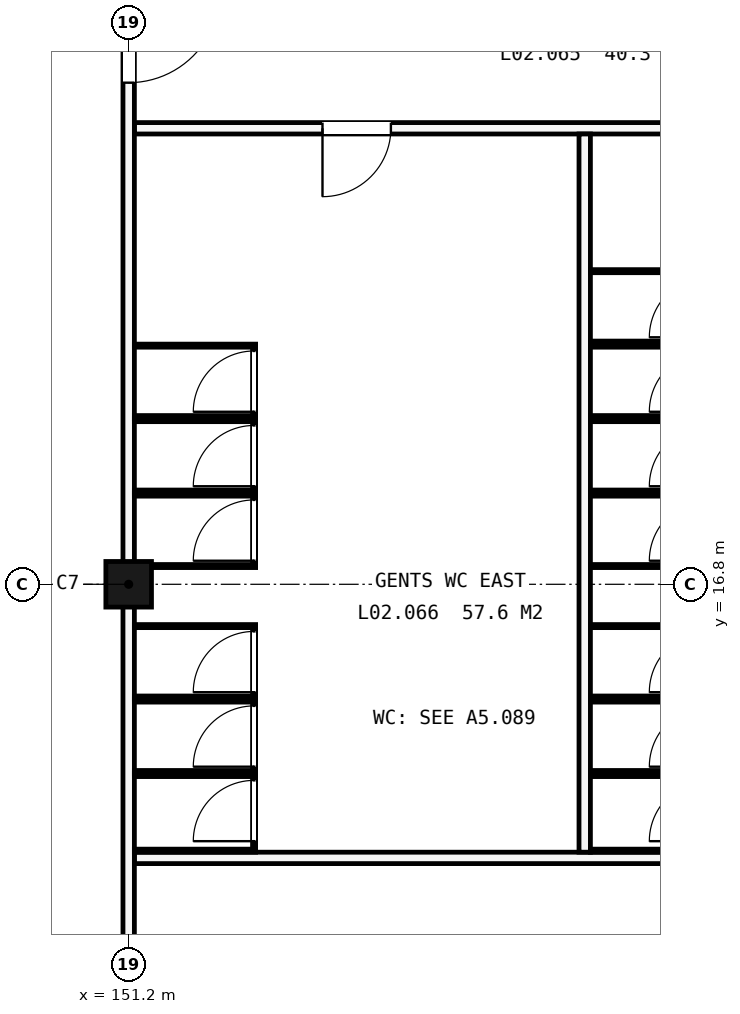
"""IFC4 building model, lengths in metres.
Left out: names, types, materials, properties, quantities, classifications, styles, units other than length and angle.
Written with IfcOpenShell. Run it as: python <this file> out.ifc"""

import sys

from ifc_helpers import new_model, si_unit, direction, frame, frame_2d, origin, origin_2d, place, context, subcontext, project, spatial, rectangle, extrude, element, fill, save


model = new_model("IFC4")
c1 = context("Model", 3, precision=1e-05, world=origin(), true_north=direction((0.0, 1.0)))
c2 = subcontext(c1, "Body", "Model", "MODEL_VIEW")
j1 = project(units=[si_unit("LENGTHUNIT", "METRE"), si_unit("PLANEANGLEUNIT", "RADIAN")], contexts=[c1])
p1 = place(None, origin())
s1 = spatial("IfcSite", under=j1, at=p1, CompositionType="ELEMENT")
p2 = place(p1, origin())
s2 = spatial("IfcBuilding", under=s1, at=p2, CompositionType="ELEMENT")
p3 = place(p2, frame((0.0, 0.0, 9.9)))
s3 = spatial("IfcBuildingStorey", under=s2, at=p3, CompositionType="ELEMENT", Elevation=9.9)
p4 = place(p3, frame((151.2, 16.8, -0.25), z_axis=(0.0, 0.0, 1.0), x_axis=(1.0, 0.0, 0.0)))
e1 = element("IfcColumn", 1, at=p4, inside=s3, PredefinedType="COLUMN", context=c2, shape_type="SweptSolid", body=[
    extrude(rectangle(XDim=0.6, YDim=0.6, at=origin_2d()), origin(), (0.0, 0.0, 1.0), 4.45),
])
p5 = place(p3, frame((151.275, 13.2, 0.0), z_axis=(0.0, 0.0, 1.0), x_axis=(1.0, 0.0, 0.0)))
e2 = element("IfcWall", 2, at=p5, inside=s3, PredefinedType="PARTITIONING", context=c2, shape_type="SweptSolid", body=[
    extrude(rectangle(XDim=16.725, YDim=0.15, at=frame_2d((8.363, 0.0))), origin(), (0.0, 0.0, 1.0), 4.2),
])
p6 = place(p5, frame((13.825, 0.0, 0.0)))
e3 = element("IfcOpeningElement", 3, at=p6, cuts=e2, PredefinedType="OPENING", context=c2, shape_type="SweptSolid", body=[
    extrude(rectangle(XDim=1.0, YDim=2.1, at=frame_2d((0.5, 1.05))), frame((0.0, 0.085, 0.0), z_axis=(0.0, -1.0, 0.0), x_axis=(1.0, 0.0, 0.0)), (0.0, 0.0, 1.0), 0.17),
])
p7 = place(p3, frame((151.275, 22.8, 0.0), z_axis=(0.0, 0.0, 1.0), x_axis=(1.0, 0.0, 0.0)))
e4 = element("IfcWall", 4, at=p7, inside=s3, PredefinedType="PARTITIONING", context=c2, shape_type="SweptSolid", body=[
    extrude(rectangle(XDim=16.575, YDim=0.15, at=frame_2d((8.288, 0.0))), origin(), (0.0, 0.0, 1.0), 4.2),
])
p8 = place(p7, frame((2.475, 0.0, 0.0)))
e5 = element("IfcOpeningElement", 5, at=p8, cuts=e4, PredefinedType="OPENING", context=c2, shape_type="SweptSolid", body=[
    extrude(rectangle(XDim=0.9, YDim=2.1, at=frame_2d((0.45, 1.05))), frame((0.0, 0.085, 0.0), z_axis=(0.0, -1.0, 0.0), x_axis=(1.0, 0.0, 0.0)), (0.0, 0.0, 1.0), 0.17),
])
p9 = place(p7, frame((8.475, 0.0, 0.0)))
e6 = element("IfcOpeningElement", 6, at=p9, cuts=e4, PredefinedType="OPENING", context=c2, shape_type="SweptSolid", body=[
    extrude(rectangle(XDim=0.9, YDim=2.1, at=frame_2d((0.45, 1.05))), frame((0.0, 0.085, 0.0), z_axis=(0.0, -1.0, 0.0), x_axis=(1.0, 0.0, 0.0)), (0.0, 0.0, 1.0), 0.17),
])
p10 = place(p7, frame((13.8, 0.0, 0.0)))
e7 = element("IfcOpeningElement", 7, at=p10, cuts=e4, PredefinedType="OPENING", context=c2, shape_type="SweptSolid", body=[
    extrude(rectangle(XDim=1.05, YDim=2.25, at=frame_2d((0.525, 1.125))), frame((0.0, 0.085, 0.0), z_axis=(0.0, -1.0, 0.0), x_axis=(1.0, 0.0, 0.0)), (0.0, 0.0, 1.0), 0.17),
])
p11 = place(p3, frame((151.2, 8.475, 0.0), z_axis=(0.0, 0.0, 1.0), x_axis=(0.0, 1.0, 0.0)))
e8 = element("IfcWall", 8, at=p11, inside=s3, PredefinedType="PARTITIONING", context=c2, shape_type="SweptSolid", body=[
    extrude(rectangle(XDim=16.65, YDim=0.15, at=frame_2d((8.325, 0.0))), origin(), (0.0, 0.0, 1.0), 3.4),
])
p12 = place(p11, frame((14.925, 0.0, 0.0)))
e9 = element("IfcOpeningElement", 9, at=p12, cuts=e8, PredefinedType="OPENING", context=c2, shape_type="SweptSolid", body=[
    extrude(rectangle(XDim=1.2, YDim=2.1, at=frame_2d((0.6, 1.05))), frame((0.0, 0.085, 0.0), z_axis=(0.0, -1.0, 0.0), x_axis=(1.0, 0.0, 0.0)), (0.0, 0.0, 1.0), 0.17),
])
p13 = place(p3, frame((157.2, 13.275, 0.0), z_axis=(0.0, 0.0, 1.0), x_axis=(0.0, 1.0, 0.0)))
e10 = element("IfcWall", 10, at=p13, inside=s3, PredefinedType="PARTITIONING", context=c2, shape_type="SweptSolid", body=[
    extrude(rectangle(XDim=9.45, YDim=0.15, at=frame_2d((4.725, 0.0))), origin(), (0.0, 0.0, 1.0), 4.2),
])
for number, where, z_axis, x_axis in (
    (11, (151.275, 13.295, 0.0), (0.0, 0.0, 1.0), (1.0, 0.0, 0.0)),
    (12, (151.275, 14.29, 0.0), (0.0, 0.0, 1.0), (1.0, 0.0, 0.0)),
):
    element("IfcWall", number, at=place(p3, frame(where, z_axis=z_axis, x_axis=x_axis)), inside=s3, PredefinedType="PARTITIONING", context=c2, shape_type="SweptSolid", body=[
        extrude(rectangle(XDim=1.595, YDim=0.04, at=frame_2d((0.798, 0.0))), origin(), (0.0, 0.0, 1.0), 2.0),
    ])
p14 = place(p3, frame((152.85, 13.315, 0.0), z_axis=(0.0, 0.0, 1.0), x_axis=(0.0, 1.0, 0.0)))
e13 = element("IfcWall", 13, at=p14, inside=s3, PredefinedType="PARTITIONING", context=c2, shape_type="SweptSolid", body=[
    extrude(rectangle(XDim=0.955, YDim=0.04, at=frame_2d((0.478, 0.0))), origin(), (0.0, 0.0, 1.0), 2.0),
])
p15 = place(p14, frame((0.105, 0.0, 0.0)))
e14 = element("IfcOpeningElement", 14, at=p15, cuts=e13, PredefinedType="OPENING", context=c2, shape_type="SweptSolid", body=[
    extrude(rectangle(XDim=0.8, YDim=2.0, at=frame_2d((0.4, 1.0))), frame((0.0, 0.03, 0.0), z_axis=(0.0, -1.0, 0.0), x_axis=(1.0, 0.0, 0.0)), (0.0, 0.0, 1.0), 0.06),
])
for number, where, z_axis, x_axis in (
    (15, (151.275, 14.33, 0.0), (0.0, 0.0, 1.0), (1.0, 0.0, 0.0)),
    (16, (151.275, 15.27, 0.0), (0.0, 0.0, 1.0), (1.0, 0.0, 0.0)),
):
    element("IfcWall", number, at=place(p3, frame(where, z_axis=z_axis, x_axis=x_axis)), inside=s3, PredefinedType="PARTITIONING", context=c2, shape_type="SweptSolid", body=[
        extrude(rectangle(XDim=1.595, YDim=0.04, at=frame_2d((0.798, 0.0))), origin(), (0.0, 0.0, 1.0), 2.0),
    ])
p16 = place(p3, frame((152.85, 14.35, 0.0), z_axis=(0.0, 0.0, 1.0), x_axis=(0.0, 1.0, 0.0)))
e17 = element("IfcWall", 17, at=p16, inside=s3, PredefinedType="PARTITIONING", context=c2, shape_type="SweptSolid", body=[
    extrude(rectangle(XDim=0.9, YDim=0.04, at=frame_2d((0.45, 0.0))), origin(), (0.0, 0.0, 1.0), 2.0),
])
p17 = place(p16, frame((0.05, 0.0, 0.0)))
e18 = element("IfcOpeningElement", 18, at=p17, cuts=e17, PredefinedType="OPENING", context=c2, shape_type="SweptSolid", body=[
    extrude(rectangle(XDim=0.8, YDim=2.0, at=frame_2d((0.4, 1.0))), frame((0.0, 0.03, 0.0), z_axis=(0.0, -1.0, 0.0), x_axis=(1.0, 0.0, 0.0)), (0.0, 0.0, 1.0), 0.06),
])
for number, where, z_axis, x_axis in (
    (19, (151.275, 15.31, 0.0), (0.0, 0.0, 1.0), (1.0, 0.0, 0.0)),
    (20, (151.275, 16.25, 0.0), (0.0, 0.0, 1.0), (1.0, 0.0, 0.0)),
):
    element("IfcWall", number, at=place(p3, frame(where, z_axis=z_axis, x_axis=x_axis)), inside=s3, PredefinedType="PARTITIONING", context=c2, shape_type="SweptSolid", body=[
        extrude(rectangle(XDim=1.595, YDim=0.04, at=frame_2d((0.798, 0.0))), origin(), (0.0, 0.0, 1.0), 2.0),
    ])
p18 = place(p3, frame((152.85, 15.33, 0.0), z_axis=(0.0, 0.0, 1.0), x_axis=(0.0, 1.0, 0.0)))
e21 = element("IfcWall", 21, at=p18, inside=s3, PredefinedType="PARTITIONING", context=c2, shape_type="SweptSolid", body=[
    extrude(rectangle(XDim=0.9, YDim=0.04, at=frame_2d((0.45, 0.0))), origin(), (0.0, 0.0, 1.0), 2.0),
])
p19 = place(p18, frame((0.05, 0.0, 0.0)))
e22 = element("IfcOpeningElement", 22, at=p19, cuts=e21, PredefinedType="OPENING", context=c2, shape_type="SweptSolid", body=[
    extrude(rectangle(XDim=0.8, YDim=2.0, at=frame_2d((0.4, 1.0))), frame((0.0, 0.03, 0.0), z_axis=(0.0, -1.0, 0.0), x_axis=(1.0, 0.0, 0.0)), (0.0, 0.0, 1.0), 0.06),
])
for number, where, z_axis, x_axis in (
    (23, (151.275, 17.04, 0.0), (0.0, 0.0, 1.0), (1.0, 0.0, 0.0)),
    (24, (151.275, 17.98, 0.0), (0.0, 0.0, 1.0), (1.0, 0.0, 0.0)),
):
    element("IfcWall", number, at=place(p3, frame(where, z_axis=z_axis, x_axis=x_axis)), inside=s3, PredefinedType="PARTITIONING", context=c2, shape_type="SweptSolid", body=[
        extrude(rectangle(XDim=1.595, YDim=0.04, at=frame_2d((0.798, 0.0))), origin(), (0.0, 0.0, 1.0), 2.0),
    ])
p20 = place(p3, frame((152.85, 17.06, 0.0), z_axis=(0.0, 0.0, 1.0), x_axis=(0.0, 1.0, 0.0)))
e25 = element("IfcWall", 25, at=p20, inside=s3, PredefinedType="PARTITIONING", context=c2, shape_type="SweptSolid", body=[
    extrude(rectangle(XDim=0.9, YDim=0.04, at=frame_2d((0.45, 0.0))), origin(), (0.0, 0.0, 1.0), 2.0),
])
p21 = place(p20, frame((0.05, 0.0, 0.0)))
e26 = element("IfcOpeningElement", 26, at=p21, cuts=e25, PredefinedType="OPENING", context=c2, shape_type="SweptSolid", body=[
    extrude(rectangle(XDim=0.8, YDim=2.0, at=frame_2d((0.4, 1.0))), frame((0.0, 0.03, 0.0), z_axis=(0.0, -1.0, 0.0), x_axis=(1.0, 0.0, 0.0)), (0.0, 0.0, 1.0), 0.06),
])
for number, where, z_axis, x_axis in (
    (27, (151.275, 18.02, 0.0), (0.0, 0.0, 1.0), (1.0, 0.0, 0.0)),
    (28, (151.275, 18.96, 0.0), (0.0, 0.0, 1.0), (1.0, 0.0, 0.0)),
):
    element("IfcWall", number, at=place(p3, frame(where, z_axis=z_axis, x_axis=x_axis)), inside=s3, PredefinedType="PARTITIONING", context=c2, shape_type="SweptSolid", body=[
        extrude(rectangle(XDim=1.595, YDim=0.04, at=frame_2d((0.798, 0.0))), origin(), (0.0, 0.0, 1.0), 2.0),
    ])
p22 = place(p3, frame((152.85, 18.04, 0.0), z_axis=(0.0, 0.0, 1.0), x_axis=(0.0, 1.0, 0.0)))
e29 = element("IfcWall", 29, at=p22, inside=s3, PredefinedType="PARTITIONING", context=c2, shape_type="SweptSolid", body=[
    extrude(rectangle(XDim=0.9, YDim=0.04, at=frame_2d((0.45, 0.0))), origin(), (0.0, 0.0, 1.0), 2.0),
])
p23 = place(p22, frame((0.05, 0.0, 0.0)))
e30 = element("IfcOpeningElement", 30, at=p23, cuts=e29, PredefinedType="OPENING", context=c2, shape_type="SweptSolid", body=[
    extrude(rectangle(XDim=0.8, YDim=2.0, at=frame_2d((0.4, 1.0))), frame((0.0, 0.03, 0.0), z_axis=(0.0, -1.0, 0.0), x_axis=(1.0, 0.0, 0.0)), (0.0, 0.0, 1.0), 0.06),
])
for number, where, z_axis, x_axis in (
    (31, (151.275, 19.0, 0.0), (0.0, 0.0, 1.0), (1.0, 0.0, 0.0)),
    (32, (151.275, 19.94, 0.0), (0.0, 0.0, 1.0), (1.0, 0.0, 0.0)),
):
    element("IfcWall", number, at=place(p3, frame(where, z_axis=z_axis, x_axis=x_axis)), inside=s3, PredefinedType="PARTITIONING", context=c2, shape_type="SweptSolid", body=[
        extrude(rectangle(XDim=1.595, YDim=0.04, at=frame_2d((0.798, 0.0))), origin(), (0.0, 0.0, 1.0), 2.0),
    ])
p24 = place(p3, frame((152.85, 19.02, 0.0), z_axis=(0.0, 0.0, 1.0), x_axis=(0.0, 1.0, 0.0)))
e33 = element("IfcWall", 33, at=p24, inside=s3, PredefinedType="PARTITIONING", context=c2, shape_type="SweptSolid", body=[
    extrude(rectangle(XDim=0.9, YDim=0.04, at=frame_2d((0.45, 0.0))), origin(), (0.0, 0.0, 1.0), 2.0),
])
p25 = place(p24, frame((0.05, 0.0, 0.0)))
e34 = element("IfcOpeningElement", 34, at=p25, cuts=e33, PredefinedType="OPENING", context=c2, shape_type="SweptSolid", body=[
    extrude(rectangle(XDim=0.8, YDim=2.0, at=frame_2d((0.4, 1.0))), frame((0.0, 0.03, 0.0), z_axis=(0.0, -1.0, 0.0), x_axis=(1.0, 0.0, 0.0)), (0.0, 0.0, 1.0), 0.06),
])
for number, where, z_axis, x_axis in (
    (35, (157.275, 13.295, 0.0), (0.0, 0.0, 1.0), (1.0, 0.0, 0.0)),
    (36, (157.275, 14.29, 0.0), (0.0, 0.0, 1.0), (1.0, 0.0, 0.0)),
    (37, (157.275, 14.33, 0.0), (0.0, 0.0, 1.0), (1.0, 0.0, 0.0)),
    (38, (157.275, 15.27, 0.0), (0.0, 0.0, 1.0), (1.0, 0.0, 0.0)),
    (39, (157.275, 15.31, 0.0), (0.0, 0.0, 1.0), (1.0, 0.0, 0.0)),
    (40, (157.275, 16.25, 0.0), (0.0, 0.0, 1.0), (1.0, 0.0, 0.0)),
    (41, (157.275, 17.04, 0.0), (0.0, 0.0, 1.0), (1.0, 0.0, 0.0)),
    (42, (157.275, 17.98, 0.0), (0.0, 0.0, 1.0), (1.0, 0.0, 0.0)),
    (43, (157.275, 18.02, 0.0), (0.0, 0.0, 1.0), (1.0, 0.0, 0.0)),
    (44, (157.275, 18.96, 0.0), (0.0, 0.0, 1.0), (1.0, 0.0, 0.0)),
    (45, (157.275, 19.0, 0.0), (0.0, 0.0, 1.0), (1.0, 0.0, 0.0)),
    (46, (157.275, 19.94, 0.0), (0.0, 0.0, 1.0), (1.0, 0.0, 0.0)),
    (47, (157.275, 19.98, 0.0), (0.0, 0.0, 1.0), (1.0, 0.0, 0.0)),
    (48, (157.275, 20.92, 0.0), (0.0, 0.0, 1.0), (1.0, 0.0, 0.0)),
):
    element("IfcWall", number, at=place(p3, frame(where, z_axis=z_axis, x_axis=x_axis)), inside=s3, PredefinedType="PARTITIONING", context=c2, shape_type="SweptSolid", body=[
        extrude(rectangle(XDim=1.595, YDim=0.04, at=frame_2d((0.798, 0.0))), origin(), (0.0, 0.0, 1.0), 2.0),
    ])
p26 = place(p12, origin())
e49 = element("IfcDoor", 49, at=p26, inside=s3, OperationType="SINGLE_SWING_RIGHT", PredefinedType="DOOR", context=c2, shape_type="SweptSolid", body=[
    extrude(rectangle(XDim=1.2, YDim=2.1, at=frame_2d((0.6, 1.05))), frame((0.0, 0.025, 0.0), z_axis=(0.0, -1.0, 0.0), x_axis=(1.0, 0.0, 0.0)), (0.0, 0.0, 1.0), 0.05),
])
fill(e9, e49)
p27 = place(p8, origin())
e50 = element("IfcDoor", 50, at=p27, inside=s3, OperationType="SINGLE_SWING_LEFT", PredefinedType="DOOR", context=c2, shape_type="SweptSolid", body=[
    extrude(rectangle(XDim=0.9, YDim=2.1, at=frame_2d((0.45, 1.05))), frame((0.0, 0.025, 0.0), z_axis=(0.0, -1.0, 0.0), x_axis=(1.0, 0.0, 0.0)), (0.0, 0.0, 1.0), 0.05),
])
fill(e5, e50)
p28 = place(p15, origin())
e51 = element("IfcDoor", 51, at=p28, inside=s3, OperationType="SINGLE_SWING_LEFT", PredefinedType="DOOR", context=c2, shape_type="SweptSolid", body=[
    extrude(rectangle(XDim=0.8, YDim=2.0, at=frame_2d((0.4, 1.0))), frame((0.0, 0.02, 0.0), z_axis=(0.0, -1.0, 0.0), x_axis=(1.0, 0.0, 0.0)), (0.0, 0.0, 1.0), 0.04),
])
fill(e14, e51)
p29 = place(p17, origin())
e52 = element("IfcDoor", 52, at=p29, inside=s3, OperationType="SINGLE_SWING_LEFT", PredefinedType="DOOR", context=c2, shape_type="SweptSolid", body=[
    extrude(rectangle(XDim=0.8, YDim=2.0, at=frame_2d((0.4, 1.0))), frame((0.0, 0.02, 0.0), z_axis=(0.0, -1.0, 0.0), x_axis=(1.0, 0.0, 0.0)), (0.0, 0.0, 1.0), 0.04),
])
fill(e18, e52)
p30 = place(p19, origin())
e53 = element("IfcDoor", 53, at=p30, inside=s3, OperationType="SINGLE_SWING_LEFT", PredefinedType="DOOR", context=c2, shape_type="SweptSolid", body=[
    extrude(rectangle(XDim=0.8, YDim=2.0, at=frame_2d((0.4, 1.0))), frame((0.0, 0.02, 0.0), z_axis=(0.0, -1.0, 0.0), x_axis=(1.0, 0.0, 0.0)), (0.0, 0.0, 1.0), 0.04),
])
fill(e22, e53)
p31 = place(p21, origin())
e54 = element("IfcDoor", 54, at=p31, inside=s3, OperationType="SINGLE_SWING_LEFT", PredefinedType="DOOR", context=c2, shape_type="SweptSolid", body=[
    extrude(rectangle(XDim=0.8, YDim=2.0, at=frame_2d((0.4, 1.0))), frame((0.0, 0.02, 0.0), z_axis=(0.0, -1.0, 0.0), x_axis=(1.0, 0.0, 0.0)), (0.0, 0.0, 1.0), 0.04),
])
fill(e26, e54)
p32 = place(p23, origin())
e55 = element("IfcDoor", 55, at=p32, inside=s3, OperationType="SINGLE_SWING_LEFT", PredefinedType="DOOR", context=c2, shape_type="SweptSolid", body=[
    extrude(rectangle(XDim=0.8, YDim=2.0, at=frame_2d((0.4, 1.0))), frame((0.0, 0.02, 0.0), z_axis=(0.0, -1.0, 0.0), x_axis=(1.0, 0.0, 0.0)), (0.0, 0.0, 1.0), 0.04),
])
fill(e30, e55)
p33 = place(p25, origin())
e56 = element("IfcDoor", 56, at=p33, inside=s3, OperationType="SINGLE_SWING_LEFT", PredefinedType="DOOR", context=c2, shape_type="SweptSolid", body=[
    extrude(rectangle(XDim=0.8, YDim=2.0, at=frame_2d((0.4, 1.0))), frame((0.0, 0.02, 0.0), z_axis=(0.0, -1.0, 0.0), x_axis=(1.0, 0.0, 0.0)), (0.0, 0.0, 1.0), 0.04),
])
fill(e34, e56)
save(model, sys.argv[1])
